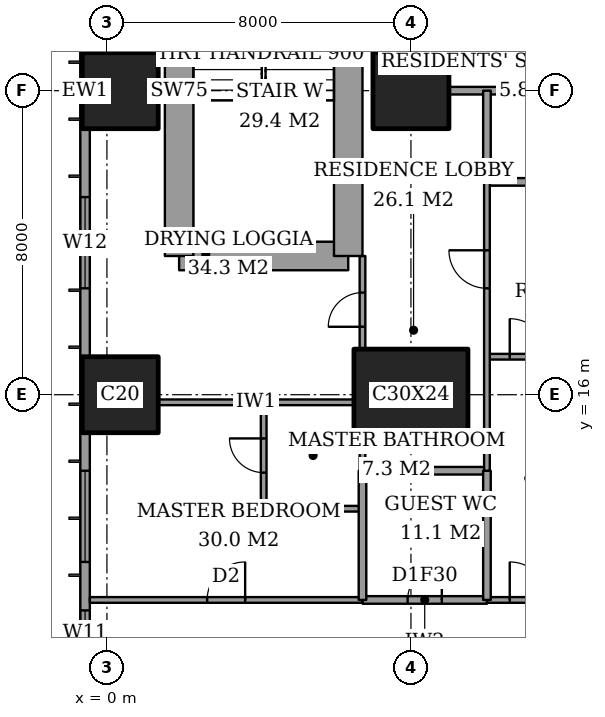
"""IFC4 building model, lengths in metres.
Left out: names, types, materials, properties, quantities, classifications, styles, units other than length and angle.
Written with IfcOpenShell. Run it as: python <this file> out.ifc"""

import sys

from ifc_helpers import new_model, si_unit, direction, frame, frame_2d, origin, origin_2d, place, context, subcontext, project, spatial, rectangle, extrude, element, fill, save


model = new_model("IFC4")
c1 = context("Model", 3, precision=1e-05, world=origin(), true_north=direction((0.0, 1.0)))
c2 = subcontext(c1, "Body", "Model", "MODEL_VIEW")
j1 = project(units=[si_unit("LENGTHUNIT", "METRE"), si_unit("PLANEANGLEUNIT", "RADIAN")], contexts=[c1])
p1 = place(None, origin())
s1 = spatial("IfcSite", under=j1, at=p1, CompositionType="ELEMENT")
p2 = place(p1, origin())
s2 = spatial("IfcBuilding", under=s1, at=p2, CompositionType="ELEMENT")
p3 = place(p2, frame((0.0, 0.0, 153.8)))
s3 = spatial("IfcBuildingStorey", under=s2, at=p3, CompositionType="ELEMENT", Elevation=153.8)
for number, where, z_axis, x_axis in (
    (1, (0.35, 16.0, 0.0), (0.0, 0.0, 1.0), (1.0, 0.0, 0.0)),
    (2, (0.35, 24.0, 0.0), (0.0, 0.0, 1.0), (1.0, 0.0, 0.0)),
):
    element("IfcColumn", number, at=place(p3, frame(where, z_axis=z_axis, x_axis=x_axis)), inside=s3, PredefinedType="COLUMN", context=c2, shape_type="SweptSolid", body=[
        extrude(rectangle(XDim=2.0, YDim=2.0, at=origin_2d()), origin(), (0.0, 0.0, 1.0), 3.6),
    ])
p4 = place(p3, frame((8.0, 16.0, 0.0), z_axis=(0.0, 0.0, 1.0), x_axis=(1.0, 0.0, 0.0)))
e3 = element("IfcColumn", 3, at=p4, inside=s3, PredefinedType="COLUMN", context=c2, shape_type="SweptSolid", body=[
    extrude(rectangle(XDim=3.0, YDim=2.4, at=origin_2d()), origin(), (0.0, 0.0, 1.0), 3.6),
])
p5 = place(p3, frame((8.0, 24.0, 0.0), z_axis=(0.0, 0.0, 1.0), x_axis=(1.0, 0.0, 0.0)))
e4 = element("IfcColumn", 4, at=p5, inside=s3, PredefinedType="COLUMN", context=c2, shape_type="SweptSolid", body=[
    extrude(rectangle(XDim=2.0, YDim=2.0, at=origin_2d()), origin(), (0.0, 0.0, 1.0), 3.6),
])
p6 = place(p3, frame((1.9, 19.65, 0.0), z_axis=(0.0, 0.0, 1.0), x_axis=(1.0, 0.0, 0.0)))
e5 = element("IfcWall", 5, at=p6, inside=s3, PredefinedType="SHEAR", context=c2, shape_type="SweptSolid", body=[
    extrude(rectangle(XDim=4.45, YDim=0.75, at=frame_2d((2.225, 0.0))), origin(), (0.0, 0.0, 1.0), 3.6),
])
p7 = place(p3, frame((6.35, 19.65, 0.0), z_axis=(0.0, 0.0, 1.0), x_axis=(0.0, 1.0, 0.0)))
e6 = element("IfcWall", 6, at=p7, inside=s3, PredefinedType="SHEAR", context=c2, shape_type="SweptSolid", body=[
    extrude(rectangle(XDim=8.7, YDim=0.75, at=frame_2d((4.35, 0.0))), origin(), (0.0, 0.0, 1.0), 3.6),
])
p8 = place(p7, frame((6.725, 0.0, 0.0)))
e7 = element("IfcOpeningElement", 7, at=p8, cuts=e6, PredefinedType="OPENING", context=c2, shape_type="SweptSolid", body=[
    extrude(rectangle(XDim=1.0, YDim=2.1, at=frame_2d((0.5, 1.05))), frame((0.0, 0.385, 0.0), z_axis=(0.0, -1.0, 0.0), x_axis=(1.0, 0.0, 0.0)), (0.0, 0.0, 1.0), 0.77),
])
p9 = place(p3, frame((1.9, 28.35, 0.0), z_axis=(0.0, 0.0, 1.0), x_axis=(0.0, -1.0, 0.0)))
e8 = element("IfcWall", 8, at=p9, inside=s3, PredefinedType="SHEAR", context=c2, shape_type="SweptSolid", body=[
    extrude(rectangle(XDim=8.7, YDim=0.75, at=frame_2d((4.35, 0.0))), origin(), (0.0, 0.0, 1.0), 3.6),
])
p10 = place(p3, frame((-0.575, 44.825, 0.0), z_axis=(0.0, 0.0, 1.0), x_axis=(0.0, -1.0, 0.0)))
e9 = element("IfcWall", 9, at=p10, inside=s3, PredefinedType="SOLIDWALL", context=c2, shape_type="SweptSolid", body=[
    extrude(rectangle(XDim=41.65, YDim=0.25, at=frame_2d((20.825, 0.0))), origin(), (0.0, 0.0, 1.0), 3.6),
])
p11 = place(p10, frame((0.775, 0.0, 0.4)))
e10 = element("IfcOpeningElement", 10, at=p11, cuts=e9, PredefinedType="OPENING", context=c2, shape_type="SweptSolid", body=[
    extrude(rectangle(XDim=2.4, YDim=2.2, at=frame_2d((1.2, 1.1))), frame((0.0, 0.135, 0.0), z_axis=(0.0, -1.0, 0.0), x_axis=(1.0, 0.0, 0.0)), (0.0, 0.0, 1.0), 0.27),
])
p12 = place(p10, frame((6.1, 0.0, 0.4)))
e11 = element("IfcOpeningElement", 11, at=p12, cuts=e9, PredefinedType="OPENING", context=c2, shape_type="SweptSolid", body=[
    extrude(rectangle(XDim=1.2, YDim=2.2, at=frame_2d((0.6, 1.1))), frame((0.0, 0.135, 0.0), z_axis=(0.0, -1.0, 0.0), x_axis=(1.0, 0.0, 0.0)), (0.0, 0.0, 1.0), 0.27),
])
p13 = place(p10, frame((8.425, 0.0, 0.4)))
e12 = element("IfcOpeningElement", 12, at=p13, cuts=e9, PredefinedType="OPENING", context=c2, shape_type="SweptSolid", body=[
    extrude(rectangle(XDim=2.4, YDim=2.2, at=frame_2d((1.2, 1.1))), frame((0.0, 0.135, 0.0), z_axis=(0.0, -1.0, 0.0), x_axis=(1.0, 0.0, 0.0)), (0.0, 0.0, 1.0), 0.27),
])
p14 = place(p10, frame((15.625, 0.0, 0.4)))
e13 = element("IfcOpeningElement", 13, at=p14, cuts=e9, PredefinedType="OPENING", context=c2, shape_type="SweptSolid", body=[
    extrude(rectangle(XDim=2.4, YDim=2.2, at=frame_2d((1.2, 1.1))), frame((0.0, 0.135, 0.0), z_axis=(0.0, -1.0, 0.0), x_axis=(1.0, 0.0, 0.0)), (0.0, 0.0, 1.0), 0.27),
])
p15 = place(p10, frame((23.625, 0.0, 0.4)))
e14 = element("IfcOpeningElement", 14, at=p15, cuts=e9, PredefinedType="OPENING", context=c2, shape_type="SweptSolid", body=[
    extrude(rectangle(XDim=2.4, YDim=2.2, at=frame_2d((1.2, 1.1))), frame((0.0, 0.135, 0.0), z_axis=(0.0, -1.0, 0.0), x_axis=(1.0, 0.0, 0.0)), (0.0, 0.0, 1.0), 0.27),
])
p16 = place(p10, frame((30.825, 0.0, 0.4)))
e15 = element("IfcOpeningElement", 15, at=p16, cuts=e9, PredefinedType="OPENING", context=c2, shape_type="SweptSolid", body=[
    extrude(rectangle(XDim=2.4, YDim=2.2, at=frame_2d((1.2, 1.1))), frame((0.0, 0.135, 0.0), z_axis=(0.0, -1.0, 0.0), x_axis=(1.0, 0.0, 0.0)), (0.0, 0.0, 1.0), 0.27),
])
p17 = place(p10, frame((34.5, 0.0, 0.4)))
e16 = element("IfcOpeningElement", 16, at=p17, cuts=e9, PredefinedType="OPENING", context=c2, shape_type="SweptSolid", body=[
    extrude(rectangle(XDim=1.2, YDim=2.2, at=frame_2d((0.6, 1.1))), frame((0.0, 0.135, 0.0), z_axis=(0.0, -1.0, 0.0), x_axis=(1.0, 0.0, 0.0)), (0.0, 0.0, 1.0), 0.27),
])
p18 = place(p10, frame((38.475, 0.0, 0.4)))
e17 = element("IfcOpeningElement", 17, at=p18, cuts=e9, PredefinedType="OPENING", context=c2, shape_type="SweptSolid", body=[
    extrude(rectangle(XDim=2.4, YDim=2.2, at=frame_2d((1.2, 1.1))), frame((0.0, 0.135, 0.0), z_axis=(0.0, -1.0, 0.0), x_axis=(1.0, 0.0, 0.0)), (0.0, 0.0, 1.0), 0.27),
])
p19 = place(p3, frame((6.725, 10.6, 0.0), z_axis=(0.0, 0.0, 1.0), x_axis=(1.0, 0.0, 0.0)))
e18 = element("IfcWall", 18, at=p19, inside=s3, PredefinedType="PARTITIONING", context=c2, shape_type="SweptSolid", body=[
    extrude(rectangle(XDim=3.275, YDim=0.2, at=frame_2d((1.637, 0.0))), origin(), (0.0, 0.0, 1.0), 3.35),
])
p20 = place(p19, frame((1.188, 0.0, 0.0)))
e19 = element("IfcOpeningElement", 19, at=p20, cuts=e18, PredefinedType="OPENING", context=c2, shape_type="SweptSolid", body=[
    extrude(rectangle(XDim=0.9, YDim=2.1, at=frame_2d((0.45, 1.05))), frame((0.0, 0.11, 0.0), z_axis=(0.0, -1.0, 0.0), x_axis=(1.0, 0.0, 0.0)), (0.0, 0.0, 1.0), 0.22),
])
p21 = place(p3, frame((-0.45, 10.6, 0.0), z_axis=(0.0, 0.0, 1.0), x_axis=(1.0, 0.0, 0.0)))
e20 = element("IfcWall", 20, at=p21, inside=s3, PredefinedType="PARTITIONING", context=c2, shape_type="SweptSolid", body=[
    extrude(rectangle(XDim=7.175, YDim=0.15, at=frame_2d((3.587, 0.0))), origin(), (0.0, 0.0, 1.0), 3.35),
])
p22 = place(p21, frame((3.087, 0.0, 0.0)))
e21 = element("IfcOpeningElement", 21, at=p22, cuts=e20, PredefinedType="OPENING", context=c2, shape_type="SweptSolid", body=[
    extrude(rectangle(XDim=1.0, YDim=2.1, at=frame_2d((0.5, 1.05))), frame((0.0, 0.085, 0.0), z_axis=(0.0, -1.0, 0.0), x_axis=(1.0, 0.0, 0.0)), (0.0, 0.0, 1.0), 0.17),
])
p23 = place(p3, frame((10.0, 10.6, 0.0), z_axis=(0.0, 0.0, 1.0), x_axis=(1.0, 0.0, 0.0)))
e22 = element("IfcWall", 22, at=p23, inside=s3, PredefinedType="PARTITIONING", context=c2, shape_type="SweptSolid", body=[
    extrude(rectangle(XDim=14.561, YDim=0.15, at=frame_2d((7.281, 0.0))), origin(), (0.0, 0.0, 1.0), 3.35),
])
p24 = place(p23, frame((0.6, 0.0, 0.0)))
e23 = element("IfcOpeningElement", 23, at=p24, cuts=e22, PredefinedType="OPENING", context=c2, shape_type="SweptSolid", body=[
    extrude(rectangle(XDim=1.0, YDim=2.1, at=frame_2d((0.5, 1.05))), frame((0.0, 0.085, 0.0), z_axis=(0.0, -1.0, 0.0), x_axis=(1.0, 0.0, 0.0)), (0.0, 0.0, 1.0), 0.17),
])
p25 = place(p23, frame((4.6, 0.0, 0.0)))
e24 = element("IfcOpeningElement", 24, at=p25, cuts=e22, PredefinedType="OPENING", context=c2, shape_type="SweptSolid", body=[
    extrude(rectangle(XDim=1.0, YDim=2.1, at=frame_2d((0.5, 1.05))), frame((0.0, 0.085, 0.0), z_axis=(0.0, -1.0, 0.0), x_axis=(1.0, 0.0, 0.0)), (0.0, 0.0, 1.0), 0.17),
])
p26 = place(p23, frame((10.725, 0.0, 0.0)))
e25 = element("IfcOpeningElement", 25, at=p26, cuts=e22, PredefinedType="OPENING", context=c2, shape_type="SweptSolid", body=[
    extrude(rectangle(XDim=1.0, YDim=2.1, at=frame_2d((0.5, 1.05))), frame((0.0, 0.085, 0.0), z_axis=(0.0, -1.0, 0.0), x_axis=(1.0, 0.0, 0.0)), (0.0, 0.0, 1.0), 0.17),
])
p27 = place(p3, frame((4.125, 13.0, 0.0), z_axis=(0.0, 0.0, 1.0), x_axis=(1.0, 0.0, 0.0)))
e26 = element("IfcWall", 26, at=p27, inside=s3, PredefinedType="PARTITIONING", context=c2, shape_type="SweptSolid", body=[
    extrude(rectangle(XDim=2.6, YDim=0.15, at=frame_2d((1.3, 0.0))), origin(), (0.0, 0.0, 1.0), 3.35),
])
p28 = place(p3, frame((6.725, 14.0, 0.0), z_axis=(0.0, 0.0, 1.0), x_axis=(1.0, 0.0, 0.0)))
e27 = element("IfcWall", 27, at=p28, inside=s3, PredefinedType="PARTITIONING", context=c2, shape_type="SweptSolid", body=[
    extrude(rectangle(XDim=3.275, YDim=0.2, at=frame_2d((1.637, 0.0))), origin(), (0.0, 0.0, 1.0), 3.35),
])
p29 = place(p3, frame((1.35, 15.8, 0.0), z_axis=(0.0, 0.0, 1.0), x_axis=(1.0, 0.0, 0.0)))
e28 = element("IfcWall", 28, at=p29, inside=s3, PredefinedType="PARTITIONING", context=c2, shape_type="SweptSolid", body=[
    extrude(rectangle(XDim=5.15, YDim=0.15, at=frame_2d((2.575, 0.0))), origin(), (0.0, 0.0, 1.0), 3.35),
])
p30 = place(p3, frame((10.0, 17.0, 0.0), z_axis=(0.0, 0.0, 1.0), x_axis=(1.0, 0.0, 0.0)))
e29 = element("IfcWall", 29, at=p30, inside=s3, PredefinedType="PARTITIONING", context=c2, shape_type="SweptSolid", body=[
    extrude(rectangle(XDim=4.4, YDim=0.15, at=frame_2d((2.2, 0.0))), origin(), (0.0, 0.0, 1.0), 3.35),
])
p31 = place(p30, frame((0.6, 0.0, 0.0)))
e30 = element("IfcOpeningElement", 30, at=p31, cuts=e29, PredefinedType="OPENING", context=c2, shape_type="SweptSolid", body=[
    extrude(rectangle(XDim=1.0, YDim=2.1, at=frame_2d((0.5, 1.05))), frame((0.0, 0.085, 0.0), z_axis=(0.0, -1.0, 0.0), x_axis=(1.0, 0.0, 0.0)), (0.0, 0.0, 1.0), 0.17),
])
p32 = place(p3, frame((10.0, 21.6, 0.0), z_axis=(0.0, 0.0, 1.0), x_axis=(1.0, 0.0, 0.0)))
e31 = element("IfcWall", 31, at=p32, inside=s3, PredefinedType="PARTITIONING", context=c2, shape_type="SweptSolid", body=[
    extrude(rectangle(XDim=4.8, YDim=0.2, at=frame_2d((2.4, 0.0))), origin(), (0.0, 0.0, 1.0), 3.35),
])
p33 = place(p32, frame((1.95, 0.0, 0.0)))
e32 = element("IfcOpeningElement", 32, at=p33, cuts=e31, PredefinedType="OPENING", context=c2, shape_type="SweptSolid", body=[
    extrude(rectangle(XDim=0.9, YDim=2.1, at=frame_2d((0.45, 1.05))), frame((0.0, 0.11, 0.0), z_axis=(0.0, -1.0, 0.0), x_axis=(1.0, 0.0, 0.0)), (0.0, 0.0, 1.0), 0.22),
])
p34 = place(p3, frame((9.0, 24.0, 0.0), z_axis=(0.0, 0.0, 1.0), x_axis=(1.0, 0.0, 0.0)))
e33 = element("IfcWall", 33, at=p34, inside=s3, PredefinedType="PARTITIONING", context=c2, shape_type="SweptSolid", body=[
    extrude(rectangle(XDim=6.0, YDim=0.2, at=frame_2d((3.0, 0.0))), origin(), (0.0, 0.0, 1.0), 3.35),
])
p35 = place(p3, frame((4.125, 13.0, 0.0), z_axis=(0.0, 0.0, 1.0), x_axis=(0.0, 1.0, 0.0)))
e34 = element("IfcWall", 34, at=p35, inside=s3, PredefinedType="PARTITIONING", context=c2, shape_type="SweptSolid", body=[
    extrude(rectangle(XDim=2.8, YDim=0.15, at=frame_2d((1.4, 0.0))), origin(), (0.0, 0.0, 1.0), 3.35),
])
p36 = place(p35, frame((0.95, 0.0, 0.0)))
e35 = element("IfcOpeningElement", 35, at=p36, cuts=e34, PredefinedType="OPENING", context=c2, shape_type="SweptSolid", body=[
    extrude(rectangle(XDim=0.9, YDim=2.1, at=frame_2d((0.45, 1.05))), frame((0.0, 0.085, 0.0), z_axis=(0.0, -1.0, 0.0), x_axis=(1.0, 0.0, 0.0)), (0.0, 0.0, 1.0), 0.17),
])
p37 = place(p3, frame((6.725, 10.6, 0.0), z_axis=(0.0, 0.0, 1.0), x_axis=(0.0, 1.0, 0.0)))
e36 = element("IfcWall", 36, at=p37, inside=s3, PredefinedType="PARTITIONING", context=c2, shape_type="SweptSolid", body=[
    extrude(rectangle(XDim=3.4, YDim=0.2, at=frame_2d((1.7, 0.0))), origin(), (0.0, 0.0, 1.0), 3.35),
])
p38 = place(p3, frame((6.725, 14.0, 0.0), z_axis=(0.0, 0.0, 1.0), x_axis=(0.0, 1.0, 0.0)))
e37 = element("IfcWall", 37, at=p38, inside=s3, PredefinedType="PARTITIONING", context=c2, shape_type="SweptSolid", body=[
    extrude(rectangle(XDim=0.8, YDim=0.15, at=frame_2d((0.4, 0.0))), origin(), (0.0, 0.0, 1.0), 3.35),
])
p39 = place(p3, frame((6.725, 17.2, 0.0), z_axis=(0.0, 0.0, 1.0), x_axis=(0.0, 1.0, 0.0)))
e38 = element("IfcWall", 38, at=p39, inside=s3, PredefinedType="PARTITIONING", context=c2, shape_type="SweptSolid", body=[
    extrude(rectangle(XDim=2.45, YDim=0.15, at=frame_2d((1.225, 0.0))), origin(), (0.0, 0.0, 1.0), 3.35),
])
p40 = place(p39, frame((0.587, 0.0, 0.0)))
e39 = element("IfcOpeningElement", 39, at=p40, cuts=e38, PredefinedType="OPENING", context=c2, shape_type="SweptSolid", body=[
    extrude(rectangle(XDim=0.9, YDim=2.1, at=frame_2d((0.45, 1.05))), frame((0.0, 0.085, 0.0), z_axis=(0.0, -1.0, 0.0), x_axis=(1.0, 0.0, 0.0)), (0.0, 0.0, 1.0), 0.17),
])
p41 = place(p3, frame((10.0, 10.6, 0.0), z_axis=(0.0, 0.0, 1.0), x_axis=(0.0, 1.0, 0.0)))
e40 = element("IfcWall", 40, at=p41, inside=s3, PredefinedType="PARTITIONING", context=c2, shape_type="SweptSolid", body=[
    extrude(rectangle(XDim=3.4, YDim=0.2, at=frame_2d((1.7, 0.0))), origin(), (0.0, 0.0, 1.0), 3.35),
])
p42 = place(p3, frame((10.0, 21.6, 0.0), z_axis=(0.0, 0.0, 1.0), x_axis=(0.0, 1.0, 0.0)))
e41 = element("IfcWall", 41, at=p42, inside=s3, PredefinedType="PARTITIONING", context=c2, shape_type="SweptSolid", body=[
    extrude(rectangle(XDim=2.4, YDim=0.2, at=frame_2d((1.2, 0.0))), origin(), (0.0, 0.0, 1.0), 3.35),
])
p43 = place(p3, frame((10.0, 14.0, 0.0), z_axis=(0.0, 0.0, 1.0), x_axis=(0.0, 1.0, 0.0)))
e42 = element("IfcWall", 42, at=p43, inside=s3, PredefinedType="PARTITIONING", context=c2, shape_type="SweptSolid", body=[
    extrude(rectangle(XDim=7.6, YDim=0.15, at=frame_2d((3.8, 0.0))), origin(), (0.0, 0.0, 1.0), 3.35),
])
p44 = place(p43, frame((4.8, 0.0, 0.0)))
e43 = element("IfcOpeningElement", 43, at=p44, cuts=e42, PredefinedType="OPENING", context=c2, shape_type="SweptSolid", body=[
    extrude(rectangle(XDim=1.0, YDim=2.1, at=frame_2d((0.5, 1.05))), frame((0.0, 0.085, 0.0), z_axis=(0.0, -1.0, 0.0), x_axis=(1.0, 0.0, 0.0)), (0.0, 0.0, 1.0), 0.17),
])
p45 = place(p15, origin())
e44 = element("IfcWindow", 44, at=p45, inside=s3, PartitioningType="SINGLE_PANEL", PredefinedType="WINDOW", context=c2, shape_type="SweptSolid", body=[
    extrude(rectangle(XDim=2.4, YDim=2.2, at=frame_2d((1.2, 1.1))), frame((0.0, 0.03, 0.0), z_axis=(0.0, -1.0, 0.0), x_axis=(1.0, 0.0, 0.0)), (0.0, 0.0, 1.0), 0.06),
])
fill(e14, e44)
p46 = place(p16, origin())
e45 = element("IfcWindow", 45, at=p46, inside=s3, PartitioningType="SINGLE_PANEL", PredefinedType="WINDOW", context=c2, shape_type="SweptSolid", body=[
    extrude(rectangle(XDim=2.4, YDim=2.2, at=frame_2d((1.2, 1.1))), frame((0.0, 0.03, 0.0), z_axis=(0.0, -1.0, 0.0), x_axis=(1.0, 0.0, 0.0)), (0.0, 0.0, 1.0), 0.06),
])
fill(e15, e45)
p47 = place(p17, origin())
e46 = element("IfcWindow", 46, at=p47, inside=s3, PartitioningType="SINGLE_PANEL", PredefinedType="WINDOW", context=c2, shape_type="SweptSolid", body=[
    extrude(rectangle(XDim=1.2, YDim=2.2, at=frame_2d((0.6, 1.1))), frame((0.0, 0.03, 0.0), z_axis=(0.0, -1.0, 0.0), x_axis=(1.0, 0.0, 0.0)), (0.0, 0.0, 1.0), 0.06),
])
fill(e16, e46)
p48 = place(p24, origin())
e47 = element("IfcDoor", 47, at=p48, inside=s3, OperationType="SINGLE_SWING_RIGHT", PredefinedType="DOOR", context=c2, shape_type="SweptSolid", body=[
    extrude(rectangle(XDim=1.0, YDim=2.1, at=frame_2d((0.5, 1.05))), frame((0.0, 0.025, 0.0), z_axis=(0.0, -1.0, 0.0), x_axis=(1.0, 0.0, 0.0)), (0.0, 0.0, 1.0), 0.05),
])
fill(e23, e47)
p49 = place(p36, origin())
e48 = element("IfcDoor", 48, at=p49, inside=s3, OperationType="SINGLE_SWING_LEFT", PredefinedType="DOOR", context=c2, shape_type="SweptSolid", body=[
    extrude(rectangle(XDim=0.9, YDim=2.1, at=frame_2d((0.45, 1.05))), frame((0.0, 0.025, 0.0), z_axis=(0.0, -1.0, 0.0), x_axis=(1.0, 0.0, 0.0)), (0.0, 0.0, 1.0), 0.05),
])
fill(e35, e48)
p50 = place(p22, origin())
e49 = element("IfcDoor", 49, at=p50, inside=s3, OperationType="SINGLE_SWING_LEFT", PredefinedType="DOOR", context=c2, shape_type="SweptSolid", body=[
    extrude(rectangle(XDim=1.0, YDim=2.1, at=frame_2d((0.5, 1.05))), frame((0.0, 0.025, 0.0), z_axis=(0.0, -1.0, 0.0), x_axis=(1.0, 0.0, 0.0)), (0.0, 0.0, 1.0), 0.05),
])
fill(e21, e49)
p51 = place(p40, origin())
e50 = element("IfcDoor", 50, at=p51, inside=s3, OperationType="SINGLE_SWING_RIGHT", PredefinedType="DOOR", context=c2, shape_type="SweptSolid", body=[
    extrude(rectangle(XDim=0.9, YDim=2.1, at=frame_2d((0.45, 1.05))), frame((0.0, 0.025, 0.0), z_axis=(0.0, -1.0, 0.0), x_axis=(1.0, 0.0, 0.0)), (0.0, 0.0, 1.0), 0.05),
])
fill(e39, e50)
p52 = place(p20, origin())
e51 = element("IfcDoor", 51, at=p52, inside=s3, OperationType="SINGLE_SWING_LEFT", PredefinedType="DOOR", context=c2, shape_type="SweptSolid", body=[
    extrude(rectangle(XDim=0.9, YDim=2.1, at=frame_2d((0.45, 1.05))), frame((0.0, 0.025, 0.0), z_axis=(0.0, -1.0, 0.0), x_axis=(1.0, 0.0, 0.0)), (0.0, 0.0, 1.0), 0.05),
])
fill(e19, e51)
p53 = place(p44, origin())
e52 = element("IfcDoor", 52, at=p53, inside=s3, OperationType="SINGLE_SWING_LEFT", PredefinedType="DOOR", context=c2, shape_type="SweptSolid", body=[
    extrude(rectangle(XDim=1.0, YDim=2.1, at=frame_2d((0.5, 1.05))), frame((0.0, 0.025, 0.0), z_axis=(0.0, -1.0, 0.0), x_axis=(1.0, 0.0, 0.0)), (0.0, 0.0, 1.0), 0.05),
])
fill(e43, e52)
p54 = place(p31, origin())
e53 = element("IfcDoor", 53, at=p54, inside=s3, OperationType="SINGLE_SWING_RIGHT", PredefinedType="DOOR", context=c2, shape_type="SweptSolid", body=[
    extrude(rectangle(XDim=1.0, YDim=2.1, at=frame_2d((0.5, 1.05))), frame((0.0, 0.025, 0.0), z_axis=(0.0, -1.0, 0.0), x_axis=(1.0, 0.0, 0.0)), (0.0, 0.0, 1.0), 0.05),
])
fill(e30, e53)
save(model, sys.argv[1])
